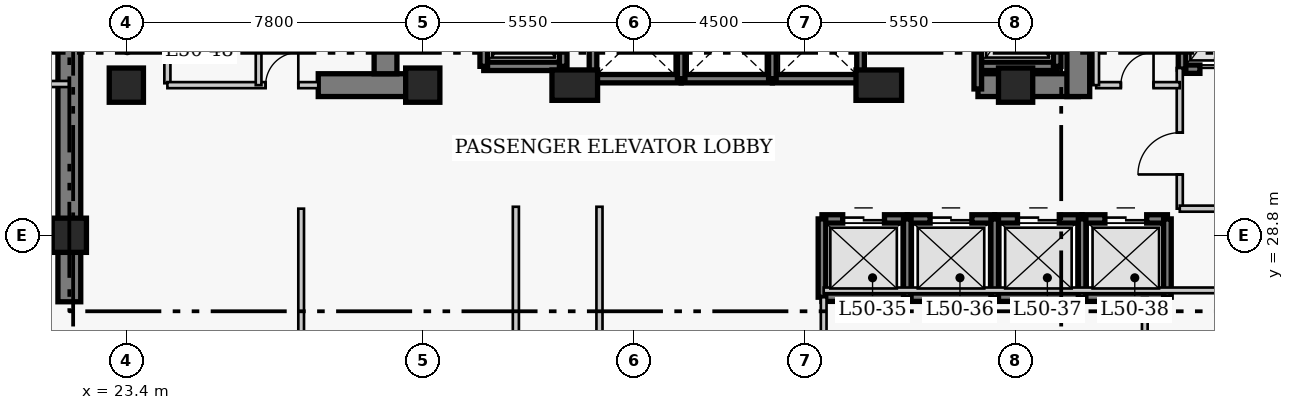
"""IFC4 building model, lengths in metres.
Left out: names, types, materials, properties, quantities, classifications, styles, units other than length and angle.
Written with IfcOpenShell. Run it as: python <this file> out.ifc"""

import sys

from ifc_helpers import new_model, si_unit, direction, frame, frame_2d, origin, origin_2d, place, context, subcontext, project, spatial, rectangle, extrude, element, fill, save


model = new_model("IFC4")
c1 = context("Model", 3, precision=1e-05, world=origin(), true_north=direction((0.0, 1.0)))
c2 = subcontext(c1, "Body", "Model", "MODEL_VIEW")
j1 = project(units=[si_unit("LENGTHUNIT", "METRE"), si_unit("PLANEANGLEUNIT", "RADIAN")], contexts=[c1])
p1 = place(None, origin())
s1 = spatial("IfcSite", under=j1, at=p1, CompositionType="ELEMENT")
p2 = place(p1, origin())
s2 = spatial("IfcBuilding", under=s1, at=p2, CompositionType="ELEMENT")
p3 = place(p2, frame((0.0, 0.0, 200.7)))
s3 = spatial("IfcBuildingStorey", under=s2, at=p3, CompositionType="ELEMENT", Elevation=200.7)
p4 = place(p3, frame((21.9, 27.05, 0.0), z_axis=(0.0, 0.0, 1.0), x_axis=(0.0, 1.0, 0.0)))
e1 = element("IfcWall", 1, at=p4, inside=s3, PredefinedType="SHEAR", context=c2, shape_type="SweptSolid", body=[
    extrude(rectangle(XDim=13.57, YDim=0.6, at=frame_2d((6.785, 0.0))), origin(), (0.0, 0.0, 1.0), 3.9),
])
p5 = place(p3, frame((28.45, 32.75, 0.0), z_axis=(0.0, 0.0, 1.0), x_axis=(1.0, 0.0, 0.0)))
e2 = element("IfcWall", 2, at=p5, inside=s3, PredefinedType="SHEAR", context=c2, shape_type="SweptSolid", body=[
    extrude(rectangle(XDim=2.4, YDim=0.6, at=frame_2d((1.2, 0.0))), origin(), (0.0, 0.0, 1.0), 3.9),
])
p6 = place(p3, frame((45.81, 32.75, 0.0), z_axis=(0.0, 0.0, 1.0), x_axis=(1.0, 0.0, 0.0)))
e3 = element("IfcWall", 3, at=p6, inside=s3, PredefinedType="SHEAR", context=c2, shape_type="SweptSolid", body=[
    extrude(rectangle(XDim=2.64, YDim=0.6, at=frame_2d((1.32, 0.0))), origin(), (0.0, 0.0, 1.0), 3.9),
])
p7 = place(p3, frame((30.22, 33.05, 0.0), z_axis=(0.0, 0.0, 1.0), x_axis=(0.0, 1.0, 0.0)))
e4 = element("IfcWall", 4, at=p7, inside=s3, PredefinedType="SHEAR", context=c2, shape_type="SweptSolid", body=[
    extrude(rectangle(XDim=7.27, YDim=0.6, at=frame_2d((3.635, 0.0))), origin(), (0.0, 0.0, 1.0), 3.9),
])
p8 = place(p3, frame((48.45, 32.45, 0.0), z_axis=(0.0, 0.0, 1.0), x_axis=(0.0, 1.0, 0.0)))
e5 = element("IfcWall", 5, at=p8, inside=s3, PredefinedType="SHEAR", context=c2, shape_type="SweptSolid", body=[
    extrude(rectangle(XDim=7.87, YDim=0.6, at=frame_2d((3.935, 0.0))), origin(), (0.0, 0.0, 1.0), 3.9),
])
p9 = place(p8, frame((5.75, 0.0, 0.0)))
e6 = element("IfcOpeningElement", 6, at=p9, cuts=e5, PredefinedType="OPENING", context=c2, shape_type="SweptSolid", body=[
    extrude(rectangle(XDim=1.1, YDim=2.15, at=frame_2d((0.55, 1.075))), frame((0.0, 0.31, 0.0), z_axis=(0.0, -1.0, 0.0), x_axis=(1.0, 0.0, 0.0)), (0.0, 0.0, 1.0), 0.62),
])
for number, where, z_axis, x_axis in (
    (7, (21.9, 28.8, 0.0), (0.0, 0.0, 1.0), (1.0, 0.0, 0.0)),
    (8, (23.4, 32.75, 0.0), (0.0, 0.0, 1.0), (1.0, 0.0, 0.0)),
    (9, (31.2, 32.75, 0.0), (0.0, 0.0, 1.0), (1.0, 0.0, 0.0)),
):
    element("IfcColumn", number, at=place(p3, frame(where, z_axis=z_axis, x_axis=x_axis)), inside=s3, PredefinedType="COLUMN", context=c2, shape_type="SweptSolid", body=[
        extrude(rectangle(XDim=0.9, YDim=0.9, at=origin_2d()), origin(), (0.0, 0.0, 1.0), 3.9),
    ])
for number, where, z_axis, x_axis in (
    (10, (35.2, 32.75, 0.0), (0.0, 0.0, 1.0), (1.0, 0.0, 0.0)),
    (11, (43.2, 32.75, 0.0), (0.0, 0.0, 1.0), (1.0, 0.0, 0.0)),
):
    element("IfcColumn", number, at=place(p3, frame(where, z_axis=z_axis, x_axis=x_axis)), inside=s3, PredefinedType="COLUMN", context=c2, shape_type="SweptSolid", body=[
        extrude(rectangle(XDim=1.2, YDim=0.8, at=origin_2d()), origin(), (0.0, 0.0, 1.0), 3.9),
    ])
p10 = place(p3, frame((46.8, 32.75, 0.0), z_axis=(0.0, 0.0, 1.0), x_axis=(1.0, 0.0, 0.0)))
e12 = element("IfcColumn", 12, at=p10, inside=s3, PredefinedType="COLUMN", context=c2, shape_type="SweptSolid", body=[
    extrude(rectangle(XDim=0.9, YDim=0.9, at=origin_2d()), origin(), (0.0, 0.0, 1.0), 3.9),
])
p11 = place(p3, frame((41.705, 29.23, 0.0), z_axis=(0.0, 0.0, 1.0), x_axis=(1.0, 0.0, 0.0)))
e13 = element("IfcWall", 13, at=p11, inside=s3, PredefinedType="SHEAR", context=c2, shape_type="SweptSolid", body=[
    extrude(rectangle(XDim=2.245, YDim=0.22, at=frame_2d((1.123, 0.0))), origin(), (0.0, 0.0, 1.0), 3.9),
])
p12 = place(p11, frame((0.545, 0.0, 0.0)))
e14 = element("IfcOpeningElement", 14, at=p12, cuts=e13, PredefinedType="OPENING", context=c2, shape_type="SweptSolid", body=[
    extrude(rectangle(XDim=1.1, YDim=2.15, at=frame_2d((0.55, 1.075))), frame((0.0, 0.12, 0.0), z_axis=(0.0, -1.0, 0.0), x_axis=(1.0, 0.0, 0.0)), (0.0, 0.0, 1.0), 0.24),
])
p13 = place(p3, frame((41.705, 27.17, 0.0), z_axis=(0.0, 0.0, 1.0), x_axis=(1.0, 0.0, 0.0)))
e15 = element("IfcWall", 15, at=p13, inside=s3, PredefinedType="SHEAR", context=c2, shape_type="SweptSolid", body=[
    extrude(rectangle(XDim=2.245, YDim=0.22, at=frame_2d((1.123, 0.0))), origin(), (0.0, 0.0, 1.0), 3.9),
])
p14 = place(p3, frame((41.705, 27.17, 0.0), z_axis=(0.0, 0.0, 1.0), x_axis=(0.0, 1.0, 0.0)))
e16 = element("IfcWall", 16, at=p14, inside=s3, PredefinedType="SHEAR", context=c2, shape_type="SweptSolid", body=[
    extrude(rectangle(XDim=2.06, YDim=0.2, at=frame_2d((1.03, 0.0))), origin(), (0.0, 0.0, 1.0), 3.9),
])
p15 = place(p3, frame((43.95, 29.23, 0.0), z_axis=(0.0, 0.0, 1.0), x_axis=(1.0, 0.0, 0.0)))
e17 = element("IfcWall", 17, at=p15, inside=s3, PredefinedType="SHEAR", context=c2, shape_type="SweptSolid", body=[
    extrude(rectangle(XDim=2.3, YDim=0.22, at=frame_2d((1.15, 0.0))), origin(), (0.0, 0.0, 1.0), 3.9),
])
p16 = place(p15, frame((0.6, 0.0, 0.0)))
e18 = element("IfcOpeningElement", 18, at=p16, cuts=e17, PredefinedType="OPENING", context=c2, shape_type="SweptSolid", body=[
    extrude(rectangle(XDim=1.1, YDim=2.15, at=frame_2d((0.55, 1.075))), frame((0.0, 0.12, 0.0), z_axis=(0.0, -1.0, 0.0), x_axis=(1.0, 0.0, 0.0)), (0.0, 0.0, 1.0), 0.24),
])
p17 = place(p3, frame((43.95, 27.17, 0.0), z_axis=(0.0, 0.0, 1.0), x_axis=(1.0, 0.0, 0.0)))
e19 = element("IfcWall", 19, at=p17, inside=s3, PredefinedType="SHEAR", context=c2, shape_type="SweptSolid", body=[
    extrude(rectangle(XDim=2.3, YDim=0.22, at=frame_2d((1.15, 0.0))), origin(), (0.0, 0.0, 1.0), 3.9),
])
p18 = place(p3, frame((43.95, 27.17, 0.0), z_axis=(0.0, 0.0, 1.0), x_axis=(0.0, 1.0, 0.0)))
e20 = element("IfcWall", 20, at=p18, inside=s3, PredefinedType="SHEAR", context=c2, shape_type="SweptSolid", body=[
    extrude(rectangle(XDim=2.06, YDim=0.2, at=frame_2d((1.03, 0.0))), origin(), (0.0, 0.0, 1.0), 3.9),
])
p19 = place(p3, frame((46.25, 29.23, 0.0), z_axis=(0.0, 0.0, 1.0), x_axis=(1.0, 0.0, 0.0)))
e21 = element("IfcWall", 21, at=p19, inside=s3, PredefinedType="SHEAR", context=c2, shape_type="SweptSolid", body=[
    extrude(rectangle(XDim=2.3, YDim=0.22, at=frame_2d((1.15, 0.0))), origin(), (0.0, 0.0, 1.0), 3.9),
])
p20 = place(p19, frame((0.6, 0.0, 0.0)))
e22 = element("IfcOpeningElement", 22, at=p20, cuts=e21, PredefinedType="OPENING", context=c2, shape_type="SweptSolid", body=[
    extrude(rectangle(XDim=1.1, YDim=2.15, at=frame_2d((0.55, 1.075))), frame((0.0, 0.12, 0.0), z_axis=(0.0, -1.0, 0.0), x_axis=(1.0, 0.0, 0.0)), (0.0, 0.0, 1.0), 0.24),
])
p21 = place(p3, frame((46.25, 27.17, 0.0), z_axis=(0.0, 0.0, 1.0), x_axis=(1.0, 0.0, 0.0)))
e23 = element("IfcWall", 23, at=p21, inside=s3, PredefinedType="SHEAR", context=c2, shape_type="SweptSolid", body=[
    extrude(rectangle(XDim=2.3, YDim=0.22, at=frame_2d((1.15, 0.0))), origin(), (0.0, 0.0, 1.0), 3.9),
])
p22 = place(p3, frame((46.25, 27.17, 0.0), z_axis=(0.0, 0.0, 1.0), x_axis=(0.0, 1.0, 0.0)))
e24 = element("IfcWall", 24, at=p22, inside=s3, PredefinedType="SHEAR", context=c2, shape_type="SweptSolid", body=[
    extrude(rectangle(XDim=2.06, YDim=0.2, at=frame_2d((1.03, 0.0))), origin(), (0.0, 0.0, 1.0), 3.9),
])
p23 = place(p3, frame((48.55, 29.23, 0.0), z_axis=(0.0, 0.0, 1.0), x_axis=(1.0, 0.0, 0.0)))
e25 = element("IfcWall", 25, at=p23, inside=s3, PredefinedType="SHEAR", context=c2, shape_type="SweptSolid", body=[
    extrude(rectangle(XDim=2.245, YDim=0.22, at=frame_2d((1.123, 0.0))), origin(), (0.0, 0.0, 1.0), 3.9),
])
p24 = place(p23, frame((0.6, 0.0, 0.0)))
e26 = element("IfcOpeningElement", 26, at=p24, cuts=e25, PredefinedType="OPENING", context=c2, shape_type="SweptSolid", body=[
    extrude(rectangle(XDim=1.1, YDim=2.15, at=frame_2d((0.55, 1.075))), frame((0.0, 0.12, 0.0), z_axis=(0.0, -1.0, 0.0), x_axis=(1.0, 0.0, 0.0)), (0.0, 0.0, 1.0), 0.24),
])
p25 = place(p3, frame((48.55, 27.17, 0.0), z_axis=(0.0, 0.0, 1.0), x_axis=(1.0, 0.0, 0.0)))
e27 = element("IfcWall", 27, at=p25, inside=s3, PredefinedType="SHEAR", context=c2, shape_type="SweptSolid", body=[
    extrude(rectangle(XDim=2.245, YDim=0.22, at=frame_2d((1.123, 0.0))), origin(), (0.0, 0.0, 1.0), 3.9),
])
for number, where, z_axis, x_axis in (
    (28, (48.55, 27.17, 0.0), (0.0, 0.0, 1.0), (0.0, 1.0, 0.0)),
    (29, (50.795, 27.17, 0.0), (0.0, 0.0, 1.0), (0.0, 1.0, 0.0)),
):
    element("IfcWall", number, at=place(p3, frame(where, z_axis=z_axis, x_axis=x_axis)), inside=s3, PredefinedType="SHEAR", context=c2, shape_type="SweptSolid", body=[
        extrude(rectangle(XDim=2.06, YDim=0.2, at=frame_2d((1.03, 0.0))), origin(), (0.0, 0.0, 1.0), 3.9),
    ])
p26 = place(p3, frame((35.68, 32.92, 0.0), z_axis=(0.0, 0.0, 1.0), x_axis=(1.0, 0.0, 0.0)))
e30 = element("IfcWall", 30, at=p26, inside=s3, PredefinedType="SHEAR", context=c2, shape_type="SweptSolid", body=[
    extrude(rectangle(XDim=2.32, YDim=0.22, at=frame_2d((1.16, 0.0))), origin(), (0.0, 0.0, 1.0), 3.9),
])
p27 = place(p3, frame((35.68, 32.92, 0.0), z_axis=(0.0, 0.0, 1.0), x_axis=(0.0, 1.0, 0.0)))
e31 = element("IfcWall", 31, at=p27, inside=s3, PredefinedType="SHEAR", context=c2, shape_type="SweptSolid", body=[
    extrude(rectangle(XDim=2.16, YDim=0.2, at=frame_2d((1.08, 0.0))), origin(), (0.0, 0.0, 1.0), 3.9),
])
p28 = place(p3, frame((38.0, 32.92, 0.0), z_axis=(0.0, 0.0, 1.0), x_axis=(1.0, 0.0, 0.0)))
e32 = element("IfcWall", 32, at=p28, inside=s3, PredefinedType="SHEAR", context=c2, shape_type="SweptSolid", body=[
    extrude(rectangle(XDim=2.4, YDim=0.22, at=frame_2d((1.2, 0.0))), origin(), (0.0, 0.0, 1.0), 3.9),
])
p29 = place(p3, frame((38.0, 32.92, 0.0), z_axis=(0.0, 0.0, 1.0), x_axis=(0.0, 1.0, 0.0)))
e33 = element("IfcWall", 33, at=p29, inside=s3, PredefinedType="SHEAR", context=c2, shape_type="SweptSolid", body=[
    extrude(rectangle(XDim=2.16, YDim=0.2, at=frame_2d((1.08, 0.0))), origin(), (0.0, 0.0, 1.0), 3.9),
])
p30 = place(p3, frame((40.4, 32.92, 0.0), z_axis=(0.0, 0.0, 1.0), x_axis=(1.0, 0.0, 0.0)))
e34 = element("IfcWall", 34, at=p30, inside=s3, PredefinedType="SHEAR", context=c2, shape_type="SweptSolid", body=[
    extrude(rectangle(XDim=2.32, YDim=0.22, at=frame_2d((1.16, 0.0))), origin(), (0.0, 0.0, 1.0), 3.9),
])
for number, where, z_axis, x_axis in (
    (35, (40.4, 32.92, 0.0), (0.0, 0.0, 1.0), (0.0, 1.0, 0.0)),
    (36, (42.72, 32.92, 0.0), (0.0, 0.0, 1.0), (0.0, 1.0, 0.0)),
):
    element("IfcWall", number, at=place(p3, frame(where, z_axis=z_axis, x_axis=x_axis)), inside=s3, PredefinedType="SHEAR", context=c2, shape_type="SweptSolid", body=[
        extrude(rectangle(XDim=2.16, YDim=0.2, at=frame_2d((1.08, 0.0))), origin(), (0.0, 0.0, 1.0), 3.9),
    ])
p31 = place(p3, frame((51.18, 33.17, 0.0), z_axis=(0.0, 0.0, 1.0), x_axis=(1.0, 0.0, 0.0)))
e37 = element("IfcWall", 37, at=p31, inside=s3, PredefinedType="SHEAR", context=c2, shape_type="SweptSolid", body=[
    extrude(rectangle(XDim=2.42, YDim=0.22, at=frame_2d((1.21, 0.0))), origin(), (0.0, 0.0, 1.0), 3.9),
])
p32 = place(p31, frame((0.47, 0.0, 0.0)))
e38 = element("IfcOpeningElement", 38, at=p32, cuts=e37, PredefinedType="OPENING", context=c2, shape_type="SweptSolid", body=[
    extrude(rectangle(XDim=1.3, YDim=2.15, at=frame_2d((0.65, 1.075))), frame((0.0, 0.12, 0.0), z_axis=(0.0, -1.0, 0.0), x_axis=(1.0, 0.0, 0.0)), (0.0, 0.0, 1.0), 0.24),
])
p33 = place(p3, frame((51.18, 33.17, 0.0), z_axis=(0.0, 0.0, 1.0), x_axis=(0.0, 1.0, 0.0)))
e39 = element("IfcWall", 39, at=p33, inside=s3, PredefinedType="SHEAR", context=c2, shape_type="SweptSolid", body=[
    extrude(rectangle(XDim=2.86, YDim=0.2, at=frame_2d((1.43, 0.0))), origin(), (0.0, 0.0, 1.0), 3.9),
])
p34 = place(p3, frame((32.805, 33.245, 0.0), z_axis=(0.0, 0.0, 1.0), x_axis=(1.0, 0.0, 0.0)))
e40 = element("IfcWall", 40, at=p34, inside=s3, PredefinedType="SHEAR", context=c2, shape_type="SweptSolid", body=[
    extrude(rectangle(XDim=2.09, YDim=0.22, at=frame_2d((1.045, 0.0))), origin(), (0.0, 0.0, 1.0), 3.9),
])
for number, where, z_axis, x_axis in (
    (41, (32.805, 33.245, 0.0), (0.0, 0.0, 1.0), (0.0, 1.0, 0.0)),
    (42, (34.895, 33.245, 0.0), (0.0, 0.0, 1.0), (0.0, 1.0, 0.0)),
):
    element("IfcWall", number, at=place(p3, frame(where, z_axis=z_axis, x_axis=x_axis)), inside=s3, PredefinedType="SHEAR", context=c2, shape_type="SweptSolid", body=[
        extrude(rectangle(XDim=2.91, YDim=0.2, at=frame_2d((1.455, 0.0))), origin(), (0.0, 0.0, 1.0), 3.9),
    ])
p35 = place(p3, frame((45.805, 33.245, 0.0), z_axis=(0.0, 0.0, 1.0), x_axis=(1.0, 0.0, 0.0)))
e43 = element("IfcWall", 43, at=p35, inside=s3, PredefinedType="SHEAR", context=c2, shape_type="SweptSolid", body=[
    extrude(rectangle(XDim=2.09, YDim=0.22, at=frame_2d((1.045, 0.0))), origin(), (0.0, 0.0, 1.0), 3.9),
])
p36 = place(p3, frame((45.805, 32.65, 0.0), z_axis=(0.0, 0.0, 1.0), x_axis=(0.0, 1.0, 0.0)))
e44 = element("IfcWall", 44, at=p36, inside=s3, PredefinedType="SHEAR", context=c2, shape_type="SweptSolid", body=[
    extrude(rectangle(XDim=3.505, YDim=0.2, at=frame_2d((1.752, 0.0))), origin(), (0.0, 0.0, 1.0), 3.9),
])
p37 = place(p3, frame((47.895, 33.245, 0.0), z_axis=(0.0, 0.0, 1.0), x_axis=(0.0, 1.0, 0.0)))
e45 = element("IfcWall", 45, at=p37, inside=s3, PredefinedType="SHEAR", context=c2, shape_type="SweptSolid", body=[
    extrude(rectangle(XDim=2.91, YDim=0.2, at=frame_2d((1.455, 0.0))), origin(), (0.0, 0.0, 1.0), 3.9),
])
p38 = place(p3, frame((24.48, 32.8, 0.0), z_axis=(0.0, 0.0, 1.0), x_axis=(0.0, 1.0, 0.0)))
e46 = element("IfcWall", 46, at=p38, inside=s3, PredefinedType="PARTITIONING", context=c2, shape_type="SweptSolid", body=[
    extrude(rectangle(XDim=3.57, YDim=0.16, at=frame_2d((1.785, 0.0))), origin(), (0.0, 0.0, 1.0), 3.65),
])
p39 = place(p38, frame((1.604, 0.0, 0.0)))
e47 = element("IfcOpeningElement", 47, at=p39, cuts=e46, PredefinedType="OPENING", context=c2, shape_type="SweptSolid", body=[
    extrude(rectangle(XDim=0.9, YDim=2.1, at=frame_2d((0.45, 1.05))), frame((0.0, 0.09, 0.0), z_axis=(0.0, -1.0, 0.0), x_axis=(1.0, 0.0, 0.0)), (0.0, 0.0, 1.0), 0.18),
])
p40 = place(p3, frame((51.12, 29.5, 0.0), z_axis=(0.0, 0.0, 1.0), x_axis=(0.0, 1.0, 0.0)))
e48 = element("IfcWall", 48, at=p40, inside=s3, PredefinedType="PARTITIONING", context=c2, shape_type="SweptSolid", body=[
    extrude(rectangle(XDim=3.7, YDim=0.16, at=frame_2d((1.85, 0.0))), origin(), (0.0, 0.0, 1.0), 3.65),
])
p41 = place(p40, frame((0.9, 0.0, 0.0)))
e49 = element("IfcOpeningElement", 49, at=p41, cuts=e48, PredefinedType="OPENING", context=c2, shape_type="SweptSolid", body=[
    extrude(rectangle(XDim=1.1, YDim=2.15, at=frame_2d((0.55, 1.075))), frame((0.0, 0.09, 0.0), z_axis=(0.0, -1.0, 0.0), x_axis=(1.0, 0.0, 0.0)), (0.0, 0.0, 1.0), 0.18),
])
p42 = place(p3, frame((51.12, 29.5, 0.0), z_axis=(0.0, 0.0, 1.0), x_axis=(1.0, 0.0, 0.0)))
e50 = element("IfcWall", 50, at=p42, inside=s3, PredefinedType="PARTITIONING", context=c2, shape_type="SweptSolid", body=[
    extrude(rectangle(XDim=5.63, YDim=0.16, at=frame_2d((2.815, 0.0))), origin(), (0.0, 0.0, 1.0), 3.65),
])
p43 = place(p3, frame((24.48, 32.75, 0.0), z_axis=(0.0, 0.0, 1.0), x_axis=(1.0, 0.0, 0.0)))
e51 = element("IfcWall", 51, at=p43, inside=s3, PredefinedType="PARTITIONING", context=c2, shape_type="SweptSolid", body=[
    extrude(rectangle(XDim=3.97, YDim=0.16, at=frame_2d((1.985, 0.0))), origin(), (0.0, 0.0, 1.0), 3.65),
])
p44 = place(p43, frame((2.585, 0.0, 0.0)))
e52 = element("IfcOpeningElement", 52, at=p44, cuts=e51, PredefinedType="OPENING", context=c2, shape_type="SweptSolid", body=[
    extrude(rectangle(XDim=0.86, YDim=2.05, at=frame_2d((0.43, 1.025))), frame((0.0, 0.09, 0.0), z_axis=(0.0, -1.0, 0.0), x_axis=(1.0, 0.0, 0.0)), (0.0, 0.0, 1.0), 0.18),
])
p45 = place(p3, frame((48.92, 32.75, 0.0), z_axis=(0.0, 0.0, 1.0), x_axis=(1.0, 0.0, 0.0)))
e53 = element("IfcWall", 53, at=p45, inside=s3, PredefinedType="PARTITIONING", context=c2, shape_type="SweptSolid", body=[
    extrude(rectangle(XDim=2.2, YDim=0.16, at=frame_2d((1.1, 0.0))), origin(), (0.0, 0.0, 1.0), 3.65),
])
p46 = place(p45, frame((0.65, 0.0, 0.0)))
e54 = element("IfcOpeningElement", 54, at=p46, cuts=e53, PredefinedType="OPENING", context=c2, shape_type="SweptSolid", body=[
    extrude(rectangle(XDim=0.86, YDim=2.05, at=frame_2d((0.43, 1.025))), frame((0.0, 0.09, 0.0), z_axis=(0.0, -1.0, 0.0), x_axis=(1.0, 0.0, 0.0)), (0.0, 0.0, 1.0), 0.18),
])
for number, where, z_axis, x_axis in (
    (55, (48.92, 32.75, 0.0), (0.0, 0.0, 1.0), (0.0, 1.0, 0.0)),
    (56, (26.88, 32.75, 0.0), (0.0, 0.0, 1.0), (0.0, 1.0, 0.0)),
):
    element("IfcWall", number, at=place(p3, frame(where, z_axis=z_axis, x_axis=x_axis)), inside=s3, PredefinedType="PARTITIONING", context=c2, shape_type="SweptSolid", body=[
        extrude(rectangle(XDim=3.62, YDim=0.15, at=frame_2d((1.81, 0.0))), origin(), (0.0, 0.0, 1.0), 3.65),
    ])
for number, where, z_axis, x_axis in (
    (57, (33.65, 18.51, 0.0), (0.0, 0.0, 1.0), (0.0, 1.0, 0.0)),
    (58, (35.85, 18.51, 0.0), (0.0, 0.0, 1.0), (0.0, 1.0, 0.0)),
):
    element("IfcWall", number, at=place(p3, frame(where, z_axis=z_axis, x_axis=x_axis)), inside=s3, PredefinedType="PARTITIONING", context=c2, shape_type="SweptSolid", body=[
        extrude(rectangle(XDim=11.04, YDim=0.16, at=frame_2d((5.52, 0.0))), origin(), (0.0, 0.0, 1.0), 3.65),
    ])
p47 = place(p3, frame((19.16, 32.78, 0.0), z_axis=(0.0, 0.0, 1.0), x_axis=(1.0, 0.0, 0.0)))
e59 = element("IfcWall", 59, at=p47, inside=s3, PredefinedType="PARTITIONING", context=c2, shape_type="SweptSolid", body=[
    extrude(rectangle(XDim=2.74, YDim=0.16, at=frame_2d((1.37, 0.0))), origin(), (0.0, 0.0, 1.0), 3.65),
])
p48 = place(p3, frame((28.0, 18.51, 0.0), z_axis=(0.0, 0.0, 1.0), x_axis=(0.0, 1.0, 0.0)))
e60 = element("IfcWall", 60, at=p48, inside=s3, PredefinedType="PARTITIONING", context=c2, shape_type="SweptSolid", body=[
    extrude(rectangle(XDim=10.99, YDim=0.15, at=frame_2d((5.495, 0.0))), origin(), (0.0, 0.0, 1.0), 3.65),
])
p49 = place(p3, frame((41.75, 18.51, 0.0), z_axis=(0.0, 0.0, 1.0), x_axis=(0.0, 1.0, 0.0)))
e61 = element("IfcWall", 61, at=p49, inside=s3, PredefinedType="PARTITIONING", context=c2, shape_type="SweptSolid", body=[
    extrude(rectangle(XDim=8.66, YDim=0.15, at=frame_2d((4.33, 0.0))), origin(), (0.0, 0.0, 1.0), 3.65),
])
p50 = place(p3, frame((50.2, 18.51, 0.0), z_axis=(0.0, 0.0, 1.0), x_axis=(0.0, 1.0, 0.0)))
e62 = element("IfcWall", 62, at=p50, inside=s3, PredefinedType="PARTITIONING", context=c2, shape_type="SweptSolid", body=[
    extrude(rectangle(XDim=8.64, YDim=0.15, at=frame_2d((4.32, 0.0))), origin(), (0.0, 0.0, 1.0), 3.65),
])
p51 = place(p3, frame((41.75, 27.35, 0.0), z_axis=(0.0, 0.0, 1.0), x_axis=(1.0, 0.0, 0.0)))
e63 = element("IfcWall", 63, at=p51, inside=s3, PredefinedType="PARTITIONING", context=c2, shape_type="SweptSolid", body=[
    extrude(rectangle(XDim=16.49, YDim=0.15, at=frame_2d((8.245, 0.0))), origin(), (0.0, 0.0, 1.0), 3.65),
])
p52 = place(p12, origin())
e64 = element("IfcDoor", 64, at=p52, inside=s3, OperationType="DOUBLE_DOOR_SLIDING", PredefinedType="DOOR", context=c2, shape_type="SweptSolid", body=[
    extrude(rectangle(XDim=1.1, YDim=2.15, at=frame_2d((0.55, 1.075))), frame((0.0, 0.025, 0.0), z_axis=(0.0, -1.0, 0.0), x_axis=(1.0, 0.0, 0.0)), (0.0, 0.0, 1.0), 0.05),
])
fill(e14, e64)
p53 = place(p16, origin())
e65 = element("IfcDoor", 65, at=p53, inside=s3, OperationType="DOUBLE_DOOR_SLIDING", PredefinedType="DOOR", context=c2, shape_type="SweptSolid", body=[
    extrude(rectangle(XDim=1.1, YDim=2.15, at=frame_2d((0.55, 1.075))), frame((0.0, 0.025, 0.0), z_axis=(0.0, -1.0, 0.0), x_axis=(1.0, 0.0, 0.0)), (0.0, 0.0, 1.0), 0.05),
])
fill(e18, e65)
p54 = place(p20, origin())
e66 = element("IfcDoor", 66, at=p54, inside=s3, OperationType="DOUBLE_DOOR_SLIDING", PredefinedType="DOOR", context=c2, shape_type="SweptSolid", body=[
    extrude(rectangle(XDim=1.1, YDim=2.15, at=frame_2d((0.55, 1.075))), frame((0.0, 0.025, 0.0), z_axis=(0.0, -1.0, 0.0), x_axis=(1.0, 0.0, 0.0)), (0.0, 0.0, 1.0), 0.05),
])
fill(e22, e66)
p55 = place(p24, origin())
e67 = element("IfcDoor", 67, at=p55, inside=s3, OperationType="DOUBLE_DOOR_SLIDING", PredefinedType="DOOR", context=c2, shape_type="SweptSolid", body=[
    extrude(rectangle(XDim=1.1, YDim=2.15, at=frame_2d((0.55, 1.075))), frame((0.0, 0.025, 0.0), z_axis=(0.0, -1.0, 0.0), x_axis=(1.0, 0.0, 0.0)), (0.0, 0.0, 1.0), 0.05),
])
fill(e26, e67)
p56 = place(p32, origin())
e68 = element("IfcDoor", 68, at=p56, inside=s3, OperationType="DOUBLE_DOOR_SLIDING", PredefinedType="DOOR", context=c2, shape_type="SweptSolid", body=[
    extrude(rectangle(XDim=1.3, YDim=2.15, at=frame_2d((0.65, 1.075))), frame((0.0, 0.025, 0.0), z_axis=(0.0, -1.0, 0.0), x_axis=(1.0, 0.0, 0.0)), (0.0, 0.0, 1.0), 0.05),
])
fill(e38, e68)
p57 = place(p41, origin())
e69 = element("IfcDoor", 69, at=p57, inside=s3, OperationType="SINGLE_SWING_LEFT", PredefinedType="DOOR", context=c2, shape_type="SweptSolid", body=[
    extrude(rectangle(XDim=1.1, YDim=2.15, at=frame_2d((0.55, 1.075))), frame((0.0, 0.025, 0.0), z_axis=(0.0, -1.0, 0.0), x_axis=(1.0, 0.0, 0.0)), (0.0, 0.0, 1.0), 0.05),
])
fill(e49, e69)
p58 = place(p44, origin())
e70 = element("IfcDoor", 70, at=p58, inside=s3, OperationType="SINGLE_SWING_RIGHT", PredefinedType="DOOR", context=c2, shape_type="SweptSolid", body=[
    extrude(rectangle(XDim=0.86, YDim=2.05, at=frame_2d((0.43, 1.025))), frame((0.0, 0.025, 0.0), z_axis=(0.0, -1.0, 0.0), x_axis=(1.0, 0.0, 0.0)), (0.0, 0.0, 1.0), 0.05),
])
fill(e52, e70)
p59 = place(p46, origin())
e71 = element("IfcDoor", 71, at=p59, inside=s3, OperationType="SINGLE_SWING_RIGHT", PredefinedType="DOOR", context=c2, shape_type="SweptSolid", body=[
    extrude(rectangle(XDim=0.86, YDim=2.05, at=frame_2d((0.43, 1.025))), frame((0.0, 0.025, 0.0), z_axis=(0.0, -1.0, 0.0), x_axis=(1.0, 0.0, 0.0)), (0.0, 0.0, 1.0), 0.05),
])
fill(e54, e71)
save(model, sys.argv[1])
